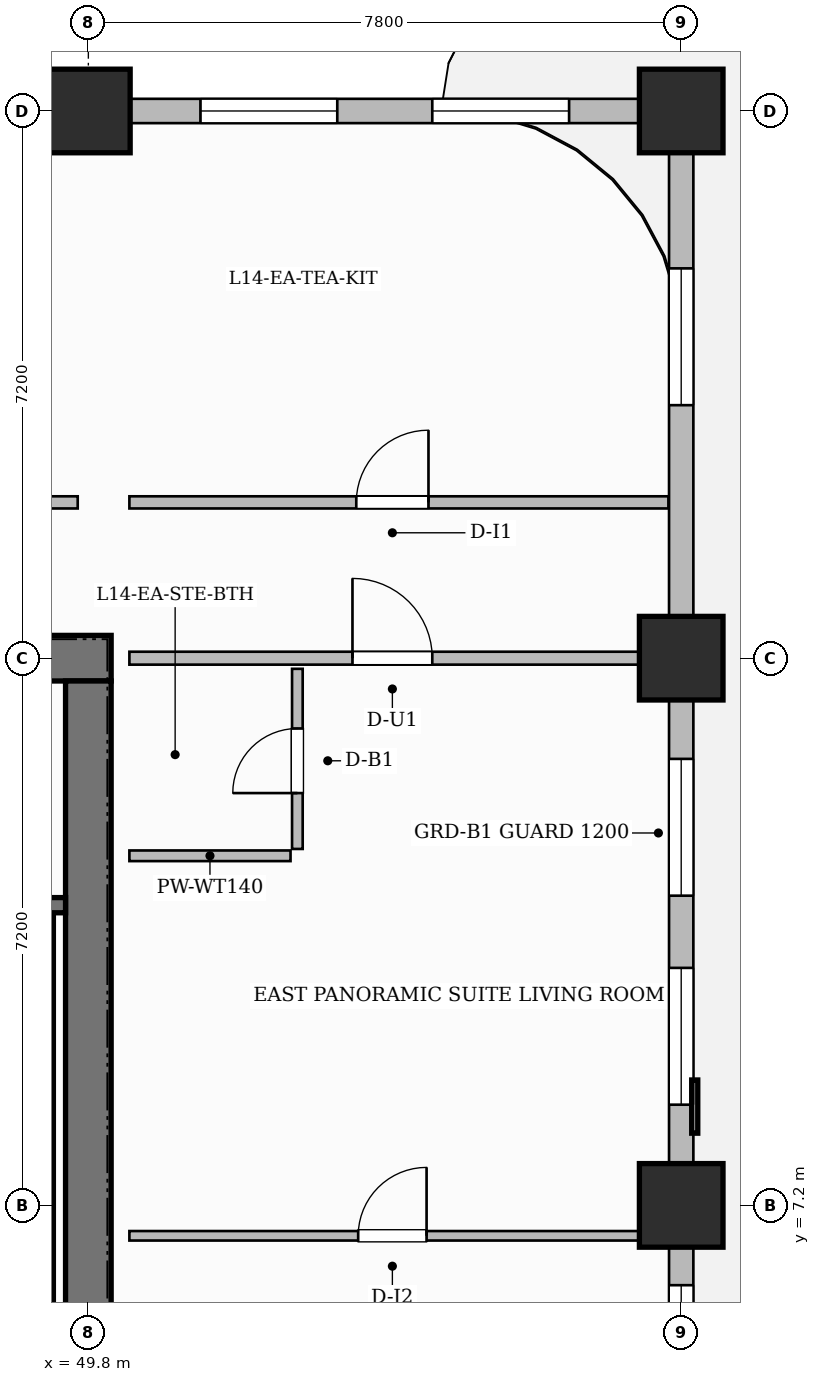
"""IFC4 building model, lengths in metres.
Left out: names, types, materials, properties, quantities, classifications, styles, units other than length and angle.
Written with IfcOpenShell. Run it as: python <this file> out.ifc"""

import sys

from ifc_helpers import new_model, si_unit, direction, frame, frame_2d, origin, origin_2d, place, context, subcontext, project, spatial, rectangle, extrude, source, transform, mapped, element, fill, save


model = new_model("IFC4")
c1 = context("Model", 3, precision=1e-05, world=origin(), true_north=direction((0.0, 1.0)))
c2 = subcontext(c1, "Body", "Model", "MODEL_VIEW")
j1 = project(units=[si_unit("LENGTHUNIT", "METRE"), si_unit("PLANEANGLEUNIT", "RADIAN")], contexts=[c1])
p1 = place(None, origin())
s1 = spatial("IfcSite", under=j1, at=p1, CompositionType="ELEMENT")
p2 = place(p1, origin())
s2 = spatial("IfcBuilding", under=s1, at=p2, CompositionType="ELEMENT")
p3 = place(p2, frame((0.0, 0.0, 62.0)))
s3 = spatial("IfcBuildingStorey", under=s2, at=p3, CompositionType="ELEMENT", Elevation=62.0)
p4 = place(p3, frame((34.5, 14.4, 0.0), z_axis=(0.0, 0.0, 1.0), x_axis=(1.0, 0.0, 0.0)))
e1 = element("IfcWall", 1, at=p4, inside=s3, PredefinedType="SHEAR", context=c2, shape_type="SweptSolid", body=[
    extrude(rectangle(XDim=15.6, YDim=0.6, at=frame_2d((7.8, 0.0))), origin(), (0.0, 0.0, 1.0), 3.7),
])
p5 = place(p4, frame((5.43, 0.0, 0.0)))
e2 = element("IfcOpeningElement", 2, at=p5, cuts=e1, PredefinedType="OPENING", context=c2, shape_type="SweptSolid", body=[
    extrude(rectangle(XDim=1.5, YDim=2.2, at=frame_2d((0.75, 1.1))), frame((0.0, 0.31, 0.0), z_axis=(0.0, -1.0, 0.0), x_axis=(1.0, 0.0, 0.0)), (0.0, 0.0, 1.0), 0.62),
])
p6 = place(p4, frame((1.645, 0.0, 0.0)))
e3 = element("IfcOpeningElement", 3, at=p6, cuts=e1, PredefinedType="OPENING", context=c2, shape_type="SweptSolid", body=[
    extrude(rectangle(XDim=1.05, YDim=2.15, at=frame_2d((0.525, 1.075))), frame((0.0, 0.31, 0.0), z_axis=(0.0, -1.0, 0.0), x_axis=(1.0, 0.0, 0.0)), (0.0, 0.0, 1.0), 0.62),
])
p7 = place(p4, frame((11.275, 0.0, 0.0)))
e4 = element("IfcOpeningElement", 4, at=p7, cuts=e1, PredefinedType="OPENING", context=c2, shape_type="SweptSolid", body=[
    extrude(rectangle(XDim=1.05, YDim=2.15, at=frame_2d((0.525, 1.075))), frame((0.0, 0.31, 0.0), z_axis=(0.0, -1.0, 0.0), x_axis=(1.0, 0.0, 0.0)), (0.0, 0.0, 1.0), 0.62),
])
p8 = place(p3, frame((49.8, 3.9, 0.0), z_axis=(0.0, 0.0, 1.0), x_axis=(0.0, 1.0, 0.0)))
e5 = element("IfcWall", 5, at=p8, inside=s3, PredefinedType="SHEAR", context=c2, shape_type="SweptSolid", body=[
    extrude(rectangle(XDim=10.2, YDim=0.6, at=frame_2d((5.1, 0.0))), origin(), (0.0, 0.0, 1.0), 3.7),
])
m1 = source(origin(), c2, "Body", "SweptSolid", [
    extrude(rectangle(XDim=1.1, YDim=1.1, at=origin_2d()), origin(), (0.0, 0.0, 1.0), 3.7),
])
for number, where, z_axis, x_axis in (
    (6, (49.8, 21.6, 0.0), (0.0, 0.0, 1.0), (1.0, 0.0, 0.0)),
    (7, (57.6, 7.2, 0.0), (0.0, 0.0, 1.0), (1.0, 0.0, 0.0)),
    (8, (57.6, 14.4, 0.0), (0.0, 0.0, 1.0), (1.0, 0.0, 0.0)),
    (9, (57.6, 21.6, 0.0), (0.0, 0.0, 1.0), (1.0, 0.0, 0.0)),
):
    element("IfcColumn", number, at=place(p3, frame(where, z_axis=z_axis, x_axis=x_axis)), inside=s3, PredefinedType="COLUMN", context=c2, shape_type="MappedRepresentation", body=[
        mapped(m1, transform((0.0, 0.0, 0.0), scale=1.0)),
    ])
p9 = place(p3, frame((49.24, 4.1, 0.0), z_axis=(0.0, 0.0, 1.0), x_axis=(0.0, 1.0, 0.0)))
e10 = element("IfcWall", 10, at=p9, inside=s3, PredefinedType="SHEAR", context=c2, shape_type="SweptSolid", body=[
    extrude(rectangle(XDim=6.95, YDim=0.2, at=frame_2d((3.475, 0.0))), origin(), (0.0, 0.0, 1.0), 3.7),
])
p10 = place(p3, frame((43.12, 11.15, 0.0), z_axis=(0.0, 0.0, 1.0), x_axis=(1.0, 0.0, 0.0)))
e11 = element("IfcWall", 11, at=p10, inside=s3, PredefinedType="SHEAR", context=c2, shape_type="SweptSolid", body=[
    extrude(rectangle(XDim=6.38, YDim=0.2, at=frame_2d((3.19, 0.0))), origin(), (0.0, 0.0, 1.0), 3.7),
])
p11 = place(p10, frame((1.045, 0.0, 0.0)))
e12 = element("IfcOpeningElement", 12, at=p11, cuts=e11, PredefinedType="OPENING", context=c2, shape_type="SweptSolid", body=[
    extrude(rectangle(XDim=1.05, YDim=2.2, at=frame_2d((0.525, 1.1))), frame((0.0, 0.11, 0.0), z_axis=(0.0, -1.0, 0.0), x_axis=(1.0, 0.0, 0.0)), (0.0, 0.0, 1.0), 0.22),
])
p12 = place(p10, frame((4.125, 0.0, 0.0)))
e13 = element("IfcOpeningElement", 13, at=p12, cuts=e11, PredefinedType="OPENING", context=c2, shape_type="SweptSolid", body=[
    extrude(rectangle(XDim=1.05, YDim=2.2, at=frame_2d((0.525, 1.1))), frame((0.0, 0.11, 0.0), z_axis=(0.0, -1.0, 0.0), x_axis=(1.0, 0.0, 0.0)), (0.0, 0.0, 1.0), 0.22),
])
p13 = place(p3, frame((30.29, 16.45, 0.0), z_axis=(0.0, 0.0, 1.0), x_axis=(1.0, 0.0, 0.0)))
e14 = element("IfcWall", 14, at=p13, inside=s3, PredefinedType="PARTITIONING", context=c2, shape_type="SweptSolid", body=[
    extrude(rectangle(XDim=19.37, YDim=0.16, at=frame_2d((9.685, 0.0))), origin(), (0.0, 0.0, 1.0), 3.45),
])
p14 = place(p13, frame((1.285, 0.0, 0.0)))
e15 = element("IfcOpeningElement", 15, at=p14, cuts=e14, PredefinedType="OPENING", context=c2, shape_type="SweptSolid", body=[
    extrude(rectangle(XDim=0.85, YDim=2.1, at=frame_2d((0.425, 1.05))), frame((0.0, 0.09, 0.0), z_axis=(0.0, -1.0, 0.0), x_axis=(1.0, 0.0, 0.0)), (0.0, 0.0, 1.0), 0.18),
])
p15 = place(p13, frame((10.66, 0.0, 0.0)))
e16 = element("IfcOpeningElement", 16, at=p15, cuts=e14, PredefinedType="OPENING", context=c2, shape_type="SweptSolid", body=[
    extrude(rectangle(XDim=1.6, YDim=2.4, at=frame_2d((0.8, 1.2))), frame((0.0, 0.09, 0.0), z_axis=(0.0, -1.0, 0.0), x_axis=(1.0, 0.0, 0.0)), (0.0, 0.0, 1.0), 0.18),
])
p16 = place(p3, frame((50.34, 14.4, 0.0), z_axis=(0.0, 0.0, 1.0), x_axis=(1.0, 0.0, 0.0)))
e17 = element("IfcWall", 17, at=p16, inside=s3, PredefinedType="PARTITIONING", context=c2, shape_type="SweptSolid", body=[
    extrude(rectangle(XDim=7.07, YDim=0.17, at=frame_2d((3.535, 0.0))), origin(), (0.0, 0.0, 1.0), 2.885),
])
p17 = place(p16, frame((2.935, 0.0, 0.0)))
e18 = element("IfcOpeningElement", 18, at=p17, cuts=e17, PredefinedType="OPENING", context=c2, shape_type="SweptSolid", body=[
    extrude(rectangle(XDim=1.05, YDim=2.25, at=frame_2d((0.525, 1.125))), frame((0.0, 0.095, 0.0), z_axis=(0.0, -1.0, 0.0), x_axis=(1.0, 0.0, 0.0)), (0.0, 0.0, 1.0), 0.19),
])
p18 = place(p3, frame((50.34, 16.45, 0.0), z_axis=(0.0, 0.0, 1.0), x_axis=(1.0, 0.0, 0.0)))
e19 = element("IfcWall", 19, at=p18, inside=s3, PredefinedType="PARTITIONING", context=c2, shape_type="SweptSolid", body=[
    extrude(rectangle(XDim=7.092, YDim=0.16, at=frame_2d((3.546, 0.0))), origin(), (0.0, 0.0, 1.0), 3.45),
])
p19 = place(p18, frame((2.985, 0.0, 0.0)))
e20 = element("IfcOpeningElement", 20, at=p19, cuts=e19, PredefinedType="OPENING", context=c2, shape_type="SweptSolid", body=[
    extrude(rectangle(XDim=0.95, YDim=2.15, at=frame_2d((0.475, 1.075))), frame((0.0, 0.09, 0.0), z_axis=(0.0, -1.0, 0.0), x_axis=(1.0, 0.0, 0.0)), (0.0, 0.0, 1.0), 0.18),
])
p20 = place(p3, frame((52.55, 11.89, 0.0), z_axis=(0.0, 0.0, 1.0), x_axis=(0.0, 1.0, 0.0)))
e21 = element("IfcWall", 21, at=p20, inside=s3, PredefinedType="PARTITIONING", context=c2, shape_type="SweptSolid", body=[
    extrude(rectangle(XDim=2.37, YDim=0.14, at=frame_2d((1.185, 0.0))), origin(), (0.0, 0.0, 1.0), 3.45),
])
p21 = place(p20, frame((0.735, 0.0, 0.0)))
e22 = element("IfcOpeningElement", 22, at=p21, cuts=e21, PredefinedType="OPENING", context=c2, shape_type="SweptSolid", body=[
    extrude(rectangle(XDim=0.85, YDim=2.1, at=frame_2d((0.425, 1.05))), frame((0.0, 0.08, 0.0), z_axis=(0.0, -1.0, 0.0), x_axis=(1.0, 0.0, 0.0)), (0.0, 0.0, 1.0), 0.16),
])
p22 = place(p3, frame((50.34, 11.8, 0.0), z_axis=(0.0, 0.0, 1.0), x_axis=(1.0, 0.0, 0.0)))
e23 = element("IfcWall", 23, at=p22, inside=s3, PredefinedType="PARTITIONING", context=c2, shape_type="SweptSolid", body=[
    extrude(rectangle(XDim=2.12, YDim=0.14, at=frame_2d((1.06, 0.0))), origin(), (0.0, 0.0, 1.0), 3.45),
])
p23 = place(p3, frame((50.34, 6.8, 0.0), z_axis=(0.0, 0.0, 1.0), x_axis=(1.0, 0.0, 0.0)))
e24 = element("IfcWall", 24, at=p23, inside=s3, PredefinedType="PARTITIONING", context=c2, shape_type="SweptSolid", body=[
    extrude(rectangle(XDim=7.07, YDim=0.125, at=frame_2d((3.535, 0.0))), origin(), (0.0, 0.0, 1.0), 3.45),
])
p24 = place(p23, frame((3.01, 0.0, 0.0)))
e25 = element("IfcOpeningElement", 25, at=p24, cuts=e24, PredefinedType="OPENING", context=c2, shape_type="SweptSolid", body=[
    extrude(rectangle(XDim=0.9, YDim=2.15, at=frame_2d((0.45, 1.075))), frame((0.0, 0.073, 0.0), z_axis=(0.0, -1.0, 0.0), x_axis=(1.0, 0.0, 0.0)), (0.0, 0.0, 1.0), 0.145),
])
p25 = place(p3, frame((57.6, 0.05, 0.0), z_axis=(0.0, 0.0, 1.0), x_axis=(0.0, 1.0, 0.0)))
e26 = element("IfcWall", 26, at=p25, inside=s3, PredefinedType="SOLIDWALL", context=c2, shape_type="SweptSolid", body=[
    extrude(rectangle(XDim=21.5, YDim=0.32, at=frame_2d((10.75, 0.0))), origin(), (0.0, 0.0, 1.0), 2.885),
])
p26 = place(p25, frame((3.4, 0.0, 0.0)))
e27 = element("IfcOpeningElement", 27, at=p26, cuts=e26, PredefinedType="OPENING", context=c2, shape_type="SweptSolid", body=[
    extrude(rectangle(XDim=1.2, YDim=2.2, at=frame_2d((0.6, 1.1))), frame((0.0, 0.17, 0.0), z_axis=(0.0, -1.0, 0.0), x_axis=(1.0, 0.0, 0.0)), (0.0, 0.0, 1.0), 0.34),
])
p27 = place(p25, frame((1.225, 0.0, 0.8)))
e28 = element("IfcOpeningElement", 28, at=p27, cuts=e26, PredefinedType="OPENING", context=c2, shape_type="SweptSolid", body=[
    extrude(rectangle(XDim=1.4, YDim=1.85, at=frame_2d((0.7, 0.925))), frame((0.0, 0.17, 0.0), z_axis=(0.0, -1.0, 0.0), x_axis=(1.0, 0.0, 0.0)), (0.0, 0.0, 1.0), 0.34),
])
p28 = place(p25, frame((5.15, 0.0, 0.8)))
e29 = element("IfcOpeningElement", 29, at=p28, cuts=e26, PredefinedType="OPENING", context=c2, shape_type="SweptSolid", body=[
    extrude(rectangle(XDim=0.95, YDim=1.75, at=frame_2d((0.475, 0.875))), frame((0.0, 0.17, 0.0), z_axis=(0.0, -1.0, 0.0), x_axis=(1.0, 0.0, 0.0)), (0.0, 0.0, 1.0), 0.34),
])
p29 = place(p25, frame((8.475, 0.0, 0.8)))
e30 = element("IfcOpeningElement", 30, at=p29, cuts=e26, PredefinedType="OPENING", context=c2, shape_type="SweptSolid", body=[
    extrude(rectangle(XDim=1.8, YDim=1.85, at=frame_2d((0.9, 0.925))), frame((0.0, 0.17, 0.0), z_axis=(0.0, -1.0, 0.0), x_axis=(1.0, 0.0, 0.0)), (0.0, 0.0, 1.0), 0.34),
])
p30 = place(p25, frame((11.225, 0.0, 0.8)))
e31 = element("IfcOpeningElement", 31, at=p30, cuts=e26, PredefinedType="OPENING", context=c2, shape_type="SweptSolid", body=[
    extrude(rectangle(XDim=1.8, YDim=1.85, at=frame_2d((0.9, 0.925))), frame((0.0, 0.17, 0.0), z_axis=(0.0, -1.0, 0.0), x_axis=(1.0, 0.0, 0.0)), (0.0, 0.0, 1.0), 0.34),
])
p31 = place(p25, frame((17.679, 0.0, 0.8)))
e32 = element("IfcOpeningElement", 32, at=p31, cuts=e26, PredefinedType="OPENING", context=c2, shape_type="SweptSolid", body=[
    extrude(rectangle(XDim=1.8, YDim=1.85, at=frame_2d((0.9, 0.925))), frame((0.0, 0.17, 0.0), z_axis=(0.0, -1.0, 0.0), x_axis=(1.0, 0.0, 0.0)), (0.0, 0.0, 1.0), 0.34),
])
p32 = place(p3, frame((14.4, 21.6, 0.0), z_axis=(0.0, 0.0, 1.0), x_axis=(1.0, 0.0, 0.0)))
e33 = element("IfcWall", 33, at=p32, inside=s3, PredefinedType="SOLIDWALL", context=c2, shape_type="SweptSolid", body=[
    extrude(rectangle(XDim=43.2, YDim=0.32, at=frame_2d((21.6, 0.0))), origin(), (0.0, 0.0, 1.0), 2.885),
])
p33 = place(p32, frame((1.5, 0.0, 0.0)))
e34 = element("IfcOpeningElement", 34, at=p33, cuts=e33, PredefinedType="OPENING", context=c2, shape_type="SweptSolid", body=[
    extrude(rectangle(XDim=1.2, YDim=2.2, at=frame_2d((0.6, 1.1))), frame((0.0, 0.17, 0.0), z_axis=(0.0, -1.0, 0.0), x_axis=(1.0, 0.0, 0.0)), (0.0, 0.0, 1.0), 0.34),
])
p34 = place(p32, frame((3.8, 0.0, 0.8)))
e35 = element("IfcOpeningElement", 35, at=p34, cuts=e33, PredefinedType="OPENING", context=c2, shape_type="SweptSolid", body=[
    extrude(rectangle(XDim=1.8, YDim=1.85, at=frame_2d((0.9, 0.925))), frame((0.0, 0.17, 0.0), z_axis=(0.0, -1.0, 0.0), x_axis=(1.0, 0.0, 0.0)), (0.0, 0.0, 1.0), 0.34),
])
p35 = place(p32, frame((8.246, 0.0, 0.8)))
e36 = element("IfcOpeningElement", 36, at=p35, cuts=e33, PredefinedType="OPENING", context=c2, shape_type="SweptSolid", body=[
    extrude(rectangle(XDim=0.95, YDim=1.75, at=frame_2d((0.475, 0.875))), frame((0.0, 0.17, 0.0), z_axis=(0.0, -1.0, 0.0), x_axis=(1.0, 0.0, 0.0)), (0.0, 0.0, 1.0), 0.34),
])
p36 = place(p32, frame((10.629, 0.0, 0.8)))
e37 = element("IfcOpeningElement", 37, at=p36, cuts=e33, PredefinedType="OPENING", context=c2, shape_type="SweptSolid", body=[
    extrude(rectangle(XDim=1.8, YDim=1.85, at=frame_2d((0.9, 0.925))), frame((0.0, 0.17, 0.0), z_axis=(0.0, -1.0, 0.0), x_axis=(1.0, 0.0, 0.0)), (0.0, 0.0, 1.0), 0.34),
])
p37 = place(p32, frame((16.701, 0.0, 0.8)))
e38 = element("IfcOpeningElement", 38, at=p37, cuts=e33, PredefinedType="OPENING", context=c2, shape_type="SweptSolid", body=[
    extrude(rectangle(XDim=1.8, YDim=1.85, at=frame_2d((0.9, 0.925))), frame((0.0, 0.17, 0.0), z_axis=(0.0, -1.0, 0.0), x_axis=(1.0, 0.0, 0.0)), (0.0, 0.0, 1.0), 0.34),
])
p38 = place(p32, frame((21.725, 0.0, 0.8)))
e39 = element("IfcOpeningElement", 39, at=p38, cuts=e33, PredefinedType="OPENING", context=c2, shape_type="SweptSolid", body=[
    extrude(rectangle(XDim=1.8, YDim=1.85, at=frame_2d((0.9, 0.925))), frame((0.0, 0.17, 0.0), z_axis=(0.0, -1.0, 0.0), x_axis=(1.0, 0.0, 0.0)), (0.0, 0.0, 1.0), 0.34),
])
p39 = place(p32, frame((24.475, 0.0, 0.8)))
e40 = element("IfcOpeningElement", 40, at=p39, cuts=e33, PredefinedType="OPENING", context=c2, shape_type="SweptSolid", body=[
    extrude(rectangle(XDim=1.8, YDim=1.85, at=frame_2d((0.9, 0.925))), frame((0.0, 0.17, 0.0), z_axis=(0.0, -1.0, 0.0), x_axis=(1.0, 0.0, 0.0)), (0.0, 0.0, 1.0), 0.34),
])
p40 = place(p32, frame((29.075, 0.0, 0.8)))
e41 = element("IfcOpeningElement", 41, at=p40, cuts=e33, PredefinedType="OPENING", context=c2, shape_type="SweptSolid", body=[
    extrude(rectangle(XDim=1.8, YDim=1.85, at=frame_2d((0.9, 0.925))), frame((0.0, 0.17, 0.0), z_axis=(0.0, -1.0, 0.0), x_axis=(1.0, 0.0, 0.0)), (0.0, 0.0, 1.0), 0.34),
])
p41 = place(p32, frame((32.125, 0.0, 0.8)))
e42 = element("IfcOpeningElement", 42, at=p41, cuts=e33, PredefinedType="OPENING", context=c2, shape_type="SweptSolid", body=[
    extrude(rectangle(XDim=1.8, YDim=1.85, at=frame_2d((0.9, 0.925))), frame((0.0, 0.17, 0.0), z_axis=(0.0, -1.0, 0.0), x_axis=(1.0, 0.0, 0.0)), (0.0, 0.0, 1.0), 0.34),
])
p42 = place(p32, frame((36.875, 0.0, 0.8)))
e43 = element("IfcOpeningElement", 43, at=p42, cuts=e33, PredefinedType="OPENING", context=c2, shape_type="SweptSolid", body=[
    extrude(rectangle(XDim=1.8, YDim=1.85, at=frame_2d((0.9, 0.925))), frame((0.0, 0.17, 0.0), z_axis=(0.0, -1.0, 0.0), x_axis=(1.0, 0.0, 0.0)), (0.0, 0.0, 1.0), 0.34),
])
p43 = place(p32, frame((39.925, 0.0, 0.8)))
e44 = element("IfcOpeningElement", 44, at=p43, cuts=e33, PredefinedType="OPENING", context=c2, shape_type="SweptSolid", body=[
    extrude(rectangle(XDim=1.8, YDim=1.85, at=frame_2d((0.9, 0.925))), frame((0.0, 0.17, 0.0), z_axis=(0.0, -1.0, 0.0), x_axis=(1.0, 0.0, 0.0)), (0.0, 0.0, 1.0), 0.34),
])
m2 = source(origin(), c2, "Body", "SweptSolid", [
    extrude(rectangle(XDim=1.05, YDim=2.25, at=frame_2d((0.525, 1.125))), frame((0.0, 0.025, 0.0), z_axis=(0.0, -1.0, 0.0), x_axis=(1.0, 0.0, 0.0)), (0.0, 0.0, 1.0), 0.05),
])
p44 = place(p17, origin())
e45 = element("IfcDoor", 45, at=p44, inside=s3, OperationType="SINGLE_SWING_LEFT", PredefinedType="DOOR", context=c2, shape_type="MappedRepresentation", body=[
    mapped(m2, transform((0.0, 0.0, 0.0), scale=1.0)),
])
fill(e18, e45)
m3 = source(origin(), c2, "Body", "SweptSolid", [
    extrude(rectangle(XDim=0.95, YDim=2.15, at=frame_2d((0.475, 1.075))), frame((0.0, 0.025, 0.0), z_axis=(0.0, -1.0, 0.0), x_axis=(1.0, 0.0, 0.0)), (0.0, 0.0, 1.0), 0.05),
])
p45 = place(p19, origin())
e46 = element("IfcDoor", 46, at=p45, inside=s3, OperationType="SINGLE_SWING_RIGHT", PredefinedType="DOOR", context=c2, shape_type="MappedRepresentation", body=[
    mapped(m3, transform((0.0, 0.0, 0.0), scale=1.0)),
])
fill(e20, e46)
m4 = source(origin(), c2, "Body", "SweptSolid", [
    extrude(rectangle(XDim=0.85, YDim=2.1, at=frame_2d((0.425, 1.05))), frame((0.0, 0.025, 0.0), z_axis=(0.0, -1.0, 0.0), x_axis=(1.0, 0.0, 0.0)), (0.0, 0.0, 1.0), 0.05),
])
p46 = place(p21, origin())
e47 = element("IfcDoor", 47, at=p46, inside=s3, OperationType="SINGLE_SWING_LEFT", PredefinedType="DOOR", context=c2, shape_type="MappedRepresentation", body=[
    mapped(m4, transform((0.0, 0.0, 0.0), scale=1.0)),
])
fill(e22, e47)
m5 = source(origin(), c2, "Body", "SweptSolid", [
    extrude(rectangle(XDim=0.9, YDim=2.15, at=frame_2d((0.45, 1.075))), frame((0.0, 0.025, 0.0), z_axis=(0.0, -1.0, 0.0), x_axis=(1.0, 0.0, 0.0)), (0.0, 0.0, 1.0), 0.05),
])
p47 = place(p24, origin())
e48 = element("IfcDoor", 48, at=p47, inside=s3, OperationType="SINGLE_SWING_RIGHT", PredefinedType="DOOR", context=c2, shape_type="MappedRepresentation", body=[
    mapped(m5, transform((0.0, 0.0, 0.0), scale=1.0)),
])
fill(e25, e48)
m6 = source(origin(), c2, "Body", "SweptSolid", [
    extrude(rectangle(XDim=0.95, YDim=1.75, at=frame_2d((0.475, 0.875))), frame((0.0, 0.03, 0.0), z_axis=(0.0, -1.0, 0.0), x_axis=(1.0, 0.0, 0.0)), (0.0, 0.0, 1.0), 0.06),
])
p48 = place(p28, origin())
e49 = element("IfcWindow", 49, at=p48, inside=s3, PartitioningType="SINGLE_PANEL", PredefinedType="WINDOW", context=c2, shape_type="MappedRepresentation", body=[
    mapped(m6, transform((0.0, 0.0, 0.0), scale=1.0)),
])
fill(e29, e49)
m7 = source(origin(), c2, "Body", "SweptSolid", [
    extrude(rectangle(XDim=1.8, YDim=1.85, at=frame_2d((0.9, 0.925))), frame((0.0, 0.03, 0.0), z_axis=(0.0, -1.0, 0.0), x_axis=(1.0, 0.0, 0.0)), (0.0, 0.0, 1.0), 0.06),
])
p49 = place(p29, origin())
e50 = element("IfcWindow", 50, at=p49, inside=s3, PartitioningType="DOUBLE_PANEL_VERTICAL", PredefinedType="WINDOW", context=c2, shape_type="MappedRepresentation", body=[
    mapped(m7, transform((0.0, 0.0, 0.0), scale=1.0)),
])
fill(e30, e50)
p50 = place(p30, origin())
e51 = element("IfcWindow", 51, at=p50, inside=s3, PartitioningType="DOUBLE_PANEL_VERTICAL", PredefinedType="WINDOW", context=c2, shape_type="MappedRepresentation", body=[
    mapped(m7, transform((0.0, 0.0, 0.0), scale=1.0)),
])
fill(e31, e51)
p51 = place(p31, origin())
e52 = element("IfcWindow", 52, at=p51, inside=s3, PartitioningType="DOUBLE_PANEL_VERTICAL", PredefinedType="WINDOW", context=c2, shape_type="MappedRepresentation", body=[
    mapped(m7, transform((0.0, 0.0, 0.0), scale=1.0)),
])
fill(e32, e52)
p52 = place(p42, origin())
e53 = element("IfcWindow", 53, at=p52, inside=s3, PartitioningType="DOUBLE_PANEL_VERTICAL", PredefinedType="WINDOW", context=c2, shape_type="MappedRepresentation", body=[
    mapped(m7, transform((0.0, 0.0, 0.0), scale=1.0)),
])
fill(e43, e53)
p53 = place(p43, origin())
e54 = element("IfcWindow", 54, at=p53, inside=s3, PartitioningType="DOUBLE_PANEL_VERTICAL", PredefinedType="WINDOW", context=c2, shape_type="MappedRepresentation", body=[
    mapped(m7, transform((0.0, 0.0, 0.0), scale=1.0)),
])
fill(e44, e54)
save(model, sys.argv[1])
